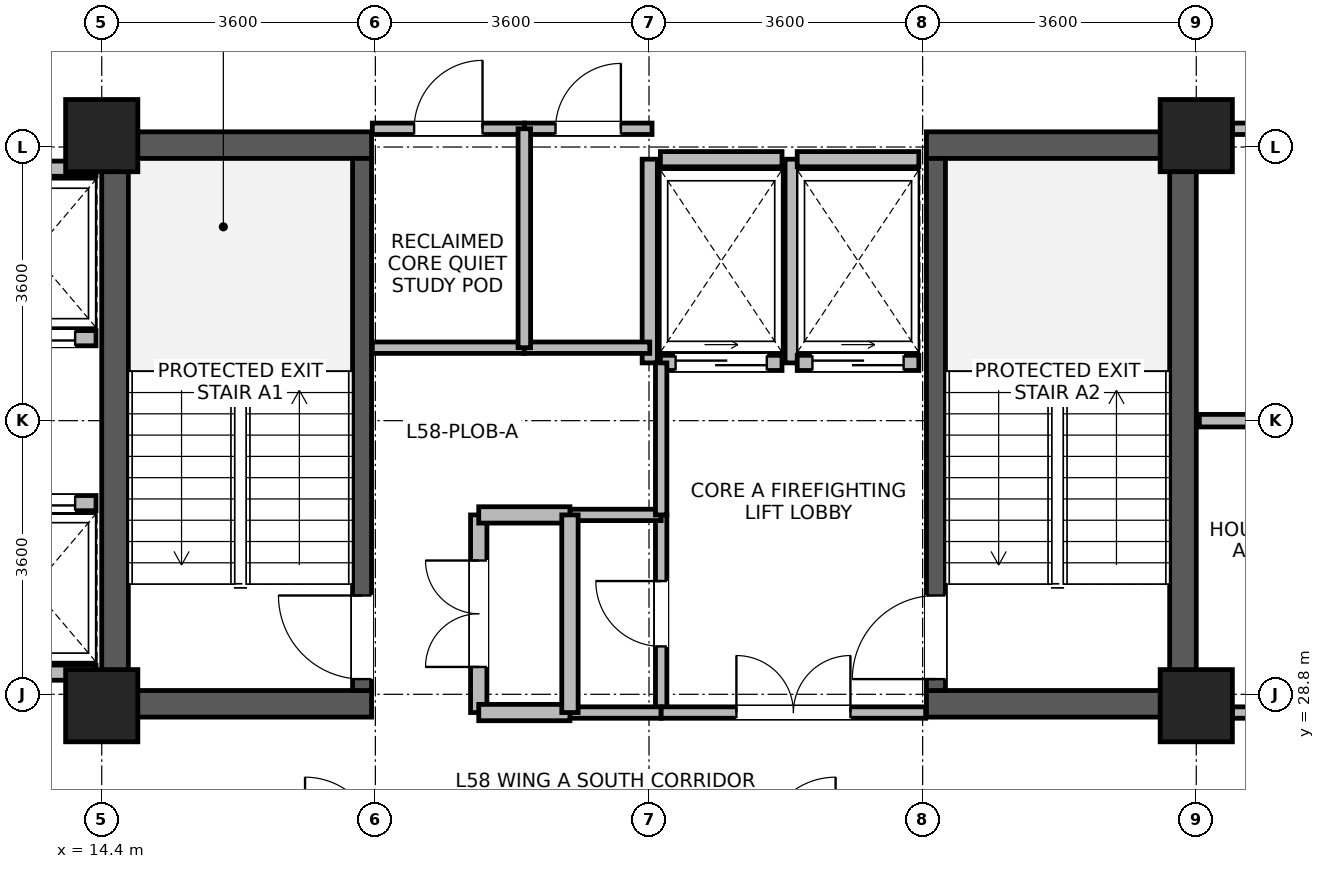
"""IFC4 building model, lengths in metres.
Left out: names, types, materials, properties, quantities, classifications, styles, units other than length and angle.
Written with IfcOpenShell. Run it as: python <this file> out.ifc"""

import sys

from ifc_helpers import new_model, si_unit, direction, frame, frame_2d, origin, origin_2d, place, context, subcontext, project, spatial, rectangle, extrude, source, transform, mapped, element, fill, save


model = new_model("IFC4")
c1 = context("Model", 3, precision=1e-05, world=origin(), true_north=direction((0.0, 1.0)))
c2 = subcontext(c1, "Body", "Model", "MODEL_VIEW")
j1 = project(units=[si_unit("LENGTHUNIT", "METRE"), si_unit("PLANEANGLEUNIT", "RADIAN")], contexts=[c1])
p1 = place(None, origin())
s1 = spatial("IfcSite", under=j1, at=p1, CompositionType="ELEMENT")
p2 = place(p1, origin())
s2 = spatial("IfcBuilding", under=s1, at=p2, CompositionType="ELEMENT")
p3 = place(p2, frame((0.0, 0.0, 227.7)))
s3 = spatial("IfcBuildingStorey", under=s2, at=p3, CompositionType="ELEMENT", Elevation=227.7)
for number, where, z_axis, x_axis in (
    (1, (14.575, 28.5, 0.0), (0.0, 0.0, 1.0), (0.0, 1.0, 0.0)),
    (2, (28.625, 28.5, 0.0), (0.0, 0.0, 1.0), (0.0, 1.0, 0.0)),
):
    element("IfcWall", number, at=place(p3, frame(where, z_axis=z_axis, x_axis=x_axis)), inside=s3, PredefinedType="SHEAR", context=c2, shape_type="SweptSolid", body=[
        extrude(rectangle(XDim=7.7, YDim=0.35, at=frame_2d((3.85, 0.0))), origin(), (0.0, 0.0, 1.0), 3.47),
    ])
for number, where, z_axis, x_axis in (
    (3, (14.75, 28.675, 0.0), (0.0, 0.0, 1.0), (1.0, 0.0, 0.0)),
    (4, (25.25, 28.675, 0.0), (0.0, 0.0, 1.0), (1.0, 0.0, 0.0)),
    (5, (14.75, 36.025, 0.0), (0.0, 0.0, 1.0), (1.0, 0.0, 0.0)),
    (6, (25.25, 36.025, 0.0), (0.0, 0.0, 1.0), (1.0, 0.0, 0.0)),
):
    element("IfcWall", number, at=place(p3, frame(where, z_axis=z_axis, x_axis=x_axis)), inside=s3, PredefinedType="SHEAR", context=c2, shape_type="SweptSolid", body=[
        extrude(rectangle(XDim=3.2, YDim=0.35, at=frame_2d((1.6, 0.0))), origin(), (0.0, 0.0, 1.0), 3.47),
    ])
p4 = place(p3, frame((17.825, 28.85, 0.0), z_axis=(0.0, 0.0, 1.0), x_axis=(0.0, 1.0, 0.0)))
e7 = element("IfcWall", 7, at=p4, inside=s3, PredefinedType="SHEAR", context=c2, shape_type="SweptSolid", body=[
    extrude(rectangle(XDim=7.0, YDim=0.25, at=frame_2d((3.5, 0.0))), origin(), (0.0, 0.0, 1.0), 3.47),
])
p5 = place(p4, frame((0.15, 0.0, 0.0)))
e8 = element("IfcOpeningElement", 8, at=p5, cuts=e7, PredefinedType="OPENING", context=c2, shape_type="SweptSolid", body=[
    extrude(rectangle(XDim=1.1, YDim=2.08, at=frame_2d((0.55, 1.04))), frame((0.0, 0.135, 0.0), z_axis=(0.0, -1.0, 0.0), x_axis=(1.0, 0.0, 0.0)), (0.0, 0.0, 1.0), 0.27),
])
p6 = place(p3, frame((25.375, 28.85, 0.0), z_axis=(0.0, 0.0, 1.0), x_axis=(0.0, 1.0, 0.0)))
e9 = element("IfcWall", 9, at=p6, inside=s3, PredefinedType="SHEAR", context=c2, shape_type="SweptSolid", body=[
    extrude(rectangle(XDim=7.0, YDim=0.25, at=frame_2d((3.5, 0.0))), origin(), (0.0, 0.0, 1.0), 3.47),
])
p7 = place(p6, frame((0.15, 0.0, 0.0)))
e10 = element("IfcOpeningElement", 10, at=p7, cuts=e9, PredefinedType="OPENING", context=c2, shape_type="SweptSolid", body=[
    extrude(rectangle(XDim=1.1, YDim=2.08, at=frame_2d((0.55, 1.04))), frame((0.0, 0.135, 0.0), z_axis=(0.0, -1.0, 0.0), x_axis=(1.0, 0.0, 0.0)), (0.0, 0.0, 1.0), 0.27),
])
m1 = source(origin(), c2, "Body", "SweptSolid", [
    extrude(rectangle(XDim=0.95, YDim=0.95, at=origin_2d()), origin(), (0.0, 0.0, 1.0), 3.7),
])
for number, where, z_axis, x_axis in (
    (11, (14.4, 28.65, 0.0), (0.0, 0.0, 1.0), (1.0, 0.0, 0.0)),
    (12, (14.4, 36.15, 0.0), (0.0, 0.0, 1.0), (1.0, 0.0, 0.0)),
    (13, (28.8, 28.65, 0.0), (0.0, 0.0, 1.0), (1.0, 0.0, 0.0)),
    (14, (28.8, 36.15, 0.0), (0.0, 0.0, 1.0), (1.0, 0.0, 0.0)),
):
    element("IfcColumn", number, at=place(p3, frame(where, z_axis=z_axis, x_axis=x_axis)), inside=s3, PredefinedType="COLUMN", context=c2, shape_type="MappedRepresentation", body=[
        mapped(m1, transform((0.0, 0.0, 0.0), x_axis=(1.0, 0.0, 0.0), y_axis=(0.0, 1.0, 0.0), z_axis=(0.0, 0.0, 1.0), scale=1.0)),
    ])
p8 = place(p3, frame((12.675, 33.485, 0.0), z_axis=(0.0, 0.0, 1.0), x_axis=(1.0, 0.0, 0.0)))
e15 = element("IfcWall", 15, at=p8, inside=s3, PredefinedType="PARTITIONING", context=c2, shape_type="SweptSolid", body=[
    extrude(rectangle(XDim=1.65, YDim=0.2, at=frame_2d((0.825, 0.0))), origin(), (0.0, 0.0, 1.0), 3.45),
])
p9 = place(p8, frame((0.275, 0.0, 0.0)))
e16 = element("IfcOpeningElement", 16, at=p9, cuts=e15, PredefinedType="OPENING", context=c2, shape_type="SweptSolid", body=[
    extrude(rectangle(XDim=1.1, YDim=2.12, at=frame_2d((0.55, 1.06))), frame((0.0, 0.11, 0.0), z_axis=(0.0, -1.0, 0.0), x_axis=(1.0, 0.0, 0.0)), (0.0, 0.0, 1.0), 0.22),
])
for number, where, z_axis, x_axis in (
    (17, (12.675, 35.715, 0.0), (0.0, 0.0, 1.0), (1.0, 0.0, 0.0)),
    (18, (12.675, 29.085, 0.0), (0.0, 0.0, 1.0), (1.0, 0.0, 0.0)),
):
    element("IfcWall", number, at=place(p3, frame(where, z_axis=z_axis, x_axis=x_axis)), inside=s3, PredefinedType="PARTITIONING", context=c2, shape_type="SweptSolid", body=[
        extrude(rectangle(XDim=1.65, YDim=0.2, at=frame_2d((0.825, 0.0))), origin(), (0.0, 0.0, 1.0), 3.45),
    ])
p10 = place(p3, frame((12.675, 31.315, 0.0), z_axis=(0.0, 0.0, 1.0), x_axis=(1.0, 0.0, 0.0)))
e19 = element("IfcWall", 19, at=p10, inside=s3, PredefinedType="PARTITIONING", context=c2, shape_type="SweptSolid", body=[
    extrude(rectangle(XDim=1.65, YDim=0.2, at=frame_2d((0.825, 0.0))), origin(), (0.0, 0.0, 1.0), 3.45),
])
p11 = place(p10, frame((0.275, 0.0, 0.0)))
e20 = element("IfcOpeningElement", 20, at=p11, cuts=e19, PredefinedType="OPENING", context=c2, shape_type="SweptSolid", body=[
    extrude(rectangle(XDim=1.1, YDim=2.12, at=frame_2d((0.55, 1.06))), frame((0.0, 0.11, 0.0), z_axis=(0.0, -1.0, 0.0), x_axis=(1.0, 0.0, 0.0)), (0.0, 0.0, 1.0), 0.22),
])
p12 = place(p3, frame((21.75, 33.16, 0.0), z_axis=(0.0, 0.0, 1.0), x_axis=(1.0, 0.0, 0.0)))
e21 = element("IfcWall", 21, at=p12, inside=s3, PredefinedType="PARTITIONING", context=c2, shape_type="SweptSolid", body=[
    extrude(rectangle(XDim=1.6, YDim=0.2, at=frame_2d((0.8, 0.0))), origin(), (0.0, 0.0, 1.0), 3.45),
])
p13 = place(p12, frame((0.2, 0.0, 0.0)))
e22 = element("IfcOpeningElement", 22, at=p13, cuts=e21, PredefinedType="OPENING", context=c2, shape_type="SweptSolid", body=[
    extrude(rectangle(XDim=1.2, YDim=2.12, at=frame_2d((0.6, 1.06))), frame((0.0, 0.11, 0.0), z_axis=(0.0, -1.0, 0.0), x_axis=(1.0, 0.0, 0.0)), (0.0, 0.0, 1.0), 0.22),
])
p14 = place(p3, frame((21.75, 35.84, 0.0), z_axis=(0.0, 0.0, 1.0), x_axis=(1.0, 0.0, 0.0)))
e23 = element("IfcWall", 23, at=p14, inside=s3, PredefinedType="PARTITIONING", context=c2, shape_type="SweptSolid", body=[
    extrude(rectangle(XDim=1.6, YDim=0.2, at=frame_2d((0.8, 0.0))), origin(), (0.0, 0.0, 1.0), 2.55),
])
for number, where, z_axis, x_axis in (
    (24, (21.61, 33.16, 0.0), (0.0, 0.0, 1.0), (0.0, 1.0, 0.0)),
    (25, (23.49, 33.16, 0.0), (0.0, 0.0, 1.0), (0.0, 1.0, 0.0)),
):
    element("IfcWall", number, at=place(p3, frame(where, z_axis=z_axis, x_axis=x_axis)), inside=s3, PredefinedType="PARTITIONING", context=c2, shape_type="SweptSolid", body=[
        extrude(rectangle(XDim=2.68, YDim=0.2, at=frame_2d((1.34, 0.0))), origin(), (0.0, 0.0, 1.0), 3.45),
    ])
p15 = place(p3, frame((23.55, 33.16, 0.0), z_axis=(0.0, 0.0, 1.0), x_axis=(1.0, 0.0, 0.0)))
e26 = element("IfcWall", 26, at=p15, inside=s3, PredefinedType="PARTITIONING", context=c2, shape_type="SweptSolid", body=[
    extrude(rectangle(XDim=1.6, YDim=0.2, at=frame_2d((0.8, 0.0))), origin(), (0.0, 0.0, 1.0), 3.45),
])
p16 = place(p15, frame((0.2, 0.0, 0.0)))
e27 = element("IfcOpeningElement", 27, at=p16, cuts=e26, PredefinedType="OPENING", context=c2, shape_type="SweptSolid", body=[
    extrude(rectangle(XDim=1.2, YDim=2.12, at=frame_2d((0.6, 1.06))), frame((0.0, 0.11, 0.0), z_axis=(0.0, -1.0, 0.0), x_axis=(1.0, 0.0, 0.0)), (0.0, 0.0, 1.0), 0.22),
])
p17 = place(p3, frame((23.55, 35.84, 0.0), z_axis=(0.0, 0.0, 1.0), x_axis=(1.0, 0.0, 0.0)))
e28 = element("IfcWall", 28, at=p17, inside=s3, PredefinedType="PARTITIONING", context=c2, shape_type="SweptSolid", body=[
    extrude(rectangle(XDim=1.6, YDim=0.2, at=frame_2d((0.8, 0.0))), origin(), (0.0, 0.0, 1.0), 2.55),
])
p18 = place(p3, frame((29.275, 36.24, 0.0), z_axis=(0.0, 0.0, 1.0), x_axis=(1.0, 0.0, 0.0)))
e29 = element("IfcWall", 29, at=p18, inside=s3, PredefinedType="PARTITIONING", context=c2, shape_type="SweptSolid", body=[
    extrude(rectangle(XDim=4.085, YDim=0.15, at=frame_2d((2.042, 0.0))), origin(), (0.0, 0.0, 1.0), 2.9),
])
p19 = place(p18, frame((1.393, 0.0, 0.0)))
e30 = element("IfcOpeningElement", 30, at=p19, cuts=e29, PredefinedType="OPENING", context=c2, shape_type="SweptSolid", body=[
    extrude(rectangle(XDim=1.3, YDim=2.12, at=frame_2d((0.65, 1.06))), frame((0.0, 0.085, 0.0), z_axis=(0.0, -1.0, 0.0), x_axis=(1.0, 0.0, 0.0)), (0.0, 0.0, 1.0), 0.17),
])
p20 = place(p3, frame((19.36, 28.56, 0.0), z_axis=(0.0, 0.0, 1.0), x_axis=(0.0, 1.0, 0.0)))
e31 = element("IfcWall", 31, at=p20, inside=s3, PredefinedType="PARTITIONING", context=c2, shape_type="SweptSolid", body=[
    extrude(rectangle(XDim=2.6, YDim=0.215, at=frame_2d((1.3, 0.0))), origin(), (0.0, 0.0, 1.0), 3.45),
])
p21 = place(p20, frame((0.6, 0.0, 0.0)))
e32 = element("IfcOpeningElement", 32, at=p21, cuts=e31, PredefinedType="OPENING", context=c2, shape_type="SweptSolid", body=[
    extrude(rectangle(XDim=1.4, YDim=2.15, at=frame_2d((0.7, 1.075))), frame((0.0, 0.118, 0.0), z_axis=(0.0, -1.0, 0.0), x_axis=(1.0, 0.0, 0.0)), (0.0, 0.0, 1.0), 0.235),
])
p22 = place(p3, frame((21.76, 28.56, 0.0), z_axis=(0.0, 0.0, 1.0), x_axis=(0.0, 1.0, 0.0)))
e33 = element("IfcWall", 33, at=p22, inside=s3, PredefinedType="PARTITIONING", context=c2, shape_type="SweptSolid", body=[
    extrude(rectangle(XDim=2.6, YDim=0.15, at=frame_2d((1.3, 0.0))), origin(), (0.0, 0.0, 1.0), 3.45),
])
p23 = place(p22, frame((0.87, 0.0, 0.0)))
e34 = element("IfcOpeningElement", 34, at=p23, cuts=e33, PredefinedType="OPENING", context=c2, shape_type="SweptSolid", body=[
    extrude(rectangle(XDim=0.86, YDim=2.02, at=frame_2d((0.43, 1.01))), frame((0.0, 0.085, 0.0), z_axis=(0.0, -1.0, 0.0), x_axis=(1.0, 0.0, 0.0)), (0.0, 0.0, 1.0), 0.17),
])
p24 = place(p3, frame((29.275, 28.56, 0.0), z_axis=(0.0, 0.0, 1.0), x_axis=(1.0, 0.0, 0.0)))
e35 = element("IfcWall", 35, at=p24, inside=s3, PredefinedType="PARTITIONING", context=c2, shape_type="SweptSolid", body=[
    extrude(rectangle(XDim=1.825, YDim=0.15, at=frame_2d((0.913, 0.0))), origin(), (0.0, 0.0, 1.0), 2.9),
])
p25 = place(p24, frame((0.482, 0.0, 0.0)))
e36 = element("IfcOpeningElement", 36, at=p25, cuts=e35, PredefinedType="OPENING", context=c2, shape_type="SweptSolid", body=[
    extrude(rectangle(XDim=0.86, YDim=2.02, at=frame_2d((0.43, 1.01))), frame((0.0, 0.085, 0.0), z_axis=(0.0, -1.0, 0.0), x_axis=(1.0, 0.0, 0.0)), (0.0, 0.0, 1.0), 0.17),
])
p26 = place(p3, frame((17.96, 33.36, 0.0), z_axis=(0.0, 0.0, 1.0), x_axis=(1.0, 0.0, 0.0)))
e37 = element("IfcWall", 37, at=p26, inside=s3, PredefinedType="PARTITIONING", context=c2, shape_type="SweptSolid", body=[
    extrude(rectangle(XDim=2.0, YDim=0.15, at=frame_2d((1.0, 0.0))), origin(), (0.0, 0.0, 1.0), 3.45),
])
p27 = place(p3, frame((17.96, 36.24, 0.0), z_axis=(0.0, 0.0, 1.0), x_axis=(1.0, 0.0, 0.0)))
e38 = element("IfcWall", 38, at=p27, inside=s3, PredefinedType="PARTITIONING", context=c2, shape_type="SweptSolid", body=[
    extrude(rectangle(XDim=2.0, YDim=0.15, at=frame_2d((1.0, 0.0))), origin(), (0.0, 0.0, 1.0), 2.55),
])
p28 = place(p27, frame((0.55, 0.0, 0.0)))
e39 = element("IfcOpeningElement", 39, at=p28, cuts=e38, PredefinedType="OPENING", context=c2, shape_type="SweptSolid", body=[
    extrude(rectangle(XDim=0.9, YDim=2.08, at=frame_2d((0.45, 1.04))), frame((0.0, 0.085, 0.0), z_axis=(0.0, -1.0, 0.0), x_axis=(1.0, 0.0, 0.0)), (0.0, 0.0, 1.0), 0.17),
])
p29 = place(p3, frame((19.96, 33.36, 0.0), z_axis=(0.0, 0.0, 1.0), x_axis=(1.0, 0.0, 0.0)))
e40 = element("IfcWall", 40, at=p29, inside=s3, PredefinedType="PARTITIONING", context=c2, shape_type="SweptSolid", body=[
    extrude(rectangle(XDim=1.65, YDim=0.15, at=frame_2d((0.825, 0.0))), origin(), (0.0, 0.0, 1.0), 3.45),
])
p30 = place(p3, frame((19.96, 36.24, 0.0), z_axis=(0.0, 0.0, 1.0), x_axis=(1.0, 0.0, 0.0)))
e41 = element("IfcWall", 41, at=p30, inside=s3, PredefinedType="PARTITIONING", context=c2, shape_type="SweptSolid", body=[
    extrude(rectangle(XDim=1.68, YDim=0.15, at=frame_2d((0.84, 0.0))), origin(), (0.0, 0.0, 1.0), 2.55),
])
p31 = place(p30, frame((0.41, 0.0, 0.0)))
e42 = element("IfcOpeningElement", 42, at=p31, cuts=e41, PredefinedType="OPENING", context=c2, shape_type="SweptSolid", body=[
    extrude(rectangle(XDim=0.86, YDim=2.02, at=frame_2d((0.43, 1.01))), frame((0.0, 0.085, 0.0), z_axis=(0.0, -1.0, 0.0), x_axis=(1.0, 0.0, 0.0)), (0.0, 0.0, 1.0), 0.17),
])
p32 = place(p3, frame((20.56, 28.56, 0.0), z_axis=(0.0, 0.0, 1.0), x_axis=(1.0, 0.0, 0.0)))
e43 = element("IfcWall", 43, at=p32, inside=s3, PredefinedType="PARTITIONING", context=c2, shape_type="SweptSolid", body=[
    extrude(rectangle(XDim=1.2, YDim=0.15, at=frame_2d((0.6, 0.0))), origin(), (0.0, 0.0, 1.0), 2.55),
])
p33 = place(p3, frame((20.56, 31.16, 0.0), z_axis=(0.0, 0.0, 1.0), x_axis=(1.0, 0.0, 0.0)))
e44 = element("IfcWall", 44, at=p33, inside=s3, PredefinedType="PARTITIONING", context=c2, shape_type="SweptSolid", body=[
    extrude(rectangle(XDim=1.2, YDim=0.15, at=frame_2d((0.6, 0.0))), origin(), (0.0, 0.0, 1.0), 3.45),
])
p34 = place(p3, frame((19.36, 28.56, 0.0), z_axis=(0.0, 0.0, 1.0), x_axis=(1.0, 0.0, 0.0)))
e45 = element("IfcWall", 45, at=p34, inside=s3, PredefinedType="PARTITIONING", context=c2, shape_type="SweptSolid", body=[
    extrude(rectangle(XDim=1.2, YDim=0.215, at=frame_2d((0.6, 0.0))), origin(), (0.0, 0.0, 1.0), 2.55),
])
p35 = place(p3, frame((19.36, 31.16, 0.0), z_axis=(0.0, 0.0, 1.0), x_axis=(1.0, 0.0, 0.0)))
e46 = element("IfcWall", 46, at=p35, inside=s3, PredefinedType="PARTITIONING", context=c2, shape_type="SweptSolid", body=[
    extrude(rectangle(XDim=1.2, YDim=0.215, at=frame_2d((0.6, 0.0))), origin(), (0.0, 0.0, 1.0), 3.45),
])
p36 = place(p3, frame((21.76, 28.56, 0.0), z_axis=(0.0, 0.0, 1.0), x_axis=(1.0, 0.0, 0.0)))
e47 = element("IfcWall", 47, at=p36, inside=s3, PredefinedType="PARTITIONING", context=c2, shape_type="SweptSolid", body=[
    extrude(rectangle(XDim=3.48, YDim=0.15, at=frame_2d((1.74, 0.0))), origin(), (0.0, 0.0, 1.0), 2.55),
])
p37 = place(p36, frame((0.99, 0.0, 0.0)))
e48 = element("IfcOpeningElement", 48, at=p37, cuts=e47, PredefinedType="OPENING", context=c2, shape_type="SweptSolid", body=[
    extrude(rectangle(XDim=1.5, YDim=2.1, at=frame_2d((0.75, 1.05))), frame((0.0, 0.085, 0.0), z_axis=(0.0, -1.0, 0.0), x_axis=(1.0, 0.0, 0.0)), (0.0, 0.0, 1.0), 0.17),
])
p38 = place(p3, frame((19.96, 33.36, 0.0), z_axis=(0.0, 0.0, 1.0), x_axis=(0.0, 1.0, 0.0)))
e49 = element("IfcWall", 49, at=p38, inside=s3, PredefinedType="PARTITIONING", context=c2, shape_type="SweptSolid", body=[
    extrude(rectangle(XDim=2.88, YDim=0.165, at=frame_2d((1.44, 0.0))), origin(), (0.0, 0.0, 1.0), 3.45),
])
p39 = place(p3, frame((20.56, 28.56, 0.0), z_axis=(0.0, 0.0, 1.0), x_axis=(0.0, 1.0, 0.0)))
e50 = element("IfcWall", 50, at=p39, inside=s3, PredefinedType="PARTITIONING", context=c2, shape_type="SweptSolid", body=[
    extrude(rectangle(XDim=2.6, YDim=0.215, at=frame_2d((1.3, 0.0))), origin(), (0.0, 0.0, 1.0), 3.45),
])
p40 = place(p3, frame((28.84, 32.4, 0.0), z_axis=(0.0, 0.0, 1.0), x_axis=(1.0, 0.0, 0.0)))
e51 = element("IfcWall", 51, at=p40, inside=s3, PredefinedType="PARTITIONING", context=c2, shape_type="SweptSolid", body=[
    extrude(rectangle(XDim=2.26, YDim=0.165, at=frame_2d((1.13, 0.0))), origin(), (0.0, 0.0, 1.0), 3.45),
])
p41 = place(p3, frame((21.76, 31.16, 0.0), z_axis=(0.0, 0.0, 1.0), x_axis=(0.0, 1.0, 0.0)))
e52 = element("IfcWall", 52, at=p41, inside=s3, PredefinedType="PARTITIONING", context=c2, shape_type="SweptSolid", body=[
    extrude(rectangle(XDim=2.0, YDim=0.15, at=frame_2d((1.0, 0.0))), origin(), (0.0, 0.0, 1.0), 3.45),
])
p42 = place(p5, origin())
e53 = element("IfcDoor", 53, at=p42, inside=s3, OperationType="SINGLE_SWING_RIGHT", PredefinedType="DOOR", context=c2, shape_type="SweptSolid", body=[
    extrude(rectangle(XDim=1.1, YDim=2.08, at=frame_2d((0.55, 1.04))), frame((0.0, 0.025, 0.0), z_axis=(0.0, -1.0, 0.0), x_axis=(1.0, 0.0, 0.0)), (0.0, 0.0, 1.0), 0.05),
])
fill(e8, e53)
p43 = place(p7, origin())
e54 = element("IfcDoor", 54, at=p43, inside=s3, OperationType="SINGLE_SWING_LEFT", PredefinedType="DOOR", context=c2, shape_type="SweptSolid", body=[
    extrude(rectangle(XDim=1.1, YDim=2.08, at=frame_2d((0.55, 1.04))), frame((0.0, 0.025, 0.0), z_axis=(0.0, -1.0, 0.0), x_axis=(1.0, 0.0, 0.0)), (0.0, 0.0, 1.0), 0.05),
])
fill(e10, e54)
p44 = place(p9, origin())
e55 = element("IfcDoor", 55, at=p44, inside=s3, OperationType="SLIDING_TO_LEFT", PredefinedType="DOOR", context=c2, shape_type="SweptSolid", body=[
    extrude(rectangle(XDim=1.1, YDim=2.12, at=frame_2d((0.55, 1.06))), frame((0.0, 0.025, 0.0), z_axis=(0.0, -1.0, 0.0), x_axis=(1.0, 0.0, 0.0)), (0.0, 0.0, 1.0), 0.05),
])
fill(e16, e55)
p45 = place(p11, origin())
e56 = element("IfcDoor", 56, at=p45, inside=s3, OperationType="SLIDING_TO_LEFT", PredefinedType="DOOR", context=c2, shape_type="SweptSolid", body=[
    extrude(rectangle(XDim=1.1, YDim=2.12, at=frame_2d((0.55, 1.06))), frame((0.0, 0.025, 0.0), z_axis=(0.0, -1.0, 0.0), x_axis=(1.0, 0.0, 0.0)), (0.0, 0.0, 1.0), 0.05),
])
fill(e20, e56)
p46 = place(p13, origin())
e57 = element("IfcDoor", 57, at=p46, inside=s3, OperationType="SLIDING_TO_RIGHT", PredefinedType="DOOR", context=c2, shape_type="SweptSolid", body=[
    extrude(rectangle(XDim=1.2, YDim=2.12, at=frame_2d((0.6, 1.06))), frame((0.0, 0.025, 0.0), z_axis=(0.0, -1.0, 0.0), x_axis=(1.0, 0.0, 0.0)), (0.0, 0.0, 1.0), 0.05),
])
fill(e22, e57)
p47 = place(p16, origin())
e58 = element("IfcDoor", 58, at=p47, inside=s3, OperationType="SLIDING_TO_RIGHT", PredefinedType="DOOR", context=c2, shape_type="SweptSolid", body=[
    extrude(rectangle(XDim=1.2, YDim=2.12, at=frame_2d((0.6, 1.06))), frame((0.0, 0.025, 0.0), z_axis=(0.0, -1.0, 0.0), x_axis=(1.0, 0.0, 0.0)), (0.0, 0.0, 1.0), 0.05),
])
fill(e27, e58)
p48 = place(p21, origin())
e59 = element("IfcDoor", 59, at=p48, inside=s3, OperationType="DOUBLE_DOOR_SINGLE_SWING", PredefinedType="DOOR", context=c2, shape_type="SweptSolid", body=[
    extrude(rectangle(XDim=1.4, YDim=2.15, at=frame_2d((0.7, 1.075))), frame((0.0, 0.025, 0.0), z_axis=(0.0, -1.0, 0.0), x_axis=(1.0, 0.0, 0.0)), (0.0, 0.0, 1.0), 0.05),
])
fill(e32, e59)
p49 = place(p23, origin())
e60 = element("IfcDoor", 60, at=p49, inside=s3, OperationType="SINGLE_SWING_RIGHT", PredefinedType="DOOR", context=c2, shape_type="SweptSolid", body=[
    extrude(rectangle(XDim=0.86, YDim=2.02, at=frame_2d((0.43, 1.01))), frame((0.0, 0.025, 0.0), z_axis=(0.0, -1.0, 0.0), x_axis=(1.0, 0.0, 0.0)), (0.0, 0.0, 1.0), 0.05),
])
fill(e34, e60)
p50 = place(p28, origin())
e61 = element("IfcDoor", 61, at=p50, inside=s3, OperationType="SINGLE_SWING_RIGHT", PredefinedType="DOOR", context=c2, shape_type="SweptSolid", body=[
    extrude(rectangle(XDim=0.9, YDim=2.08, at=frame_2d((0.45, 1.04))), frame((0.0, 0.025, 0.0), z_axis=(0.0, -1.0, 0.0), x_axis=(1.0, 0.0, 0.0)), (0.0, 0.0, 1.0), 0.05),
])
fill(e39, e61)
p51 = place(p31, origin())
e62 = element("IfcDoor", 62, at=p51, inside=s3, OperationType="SINGLE_SWING_RIGHT", PredefinedType="DOOR", context=c2, shape_type="SweptSolid", body=[
    extrude(rectangle(XDim=0.86, YDim=2.02, at=frame_2d((0.43, 1.01))), frame((0.0, 0.025, 0.0), z_axis=(0.0, -1.0, 0.0), x_axis=(1.0, 0.0, 0.0)), (0.0, 0.0, 1.0), 0.05),
])
fill(e42, e62)
p52 = place(p37, origin())
e63 = element("IfcDoor", 63, at=p52, inside=s3, OperationType="DOUBLE_DOOR_SINGLE_SWING", PredefinedType="DOOR", context=c2, shape_type="SweptSolid", body=[
    extrude(rectangle(XDim=1.5, YDim=2.1, at=frame_2d((0.75, 1.05))), frame((0.0, 0.025, 0.0), z_axis=(0.0, -1.0, 0.0), x_axis=(1.0, 0.0, 0.0)), (0.0, 0.0, 1.0), 0.05),
])
fill(e48, e63)
save(model, sys.argv[1])
